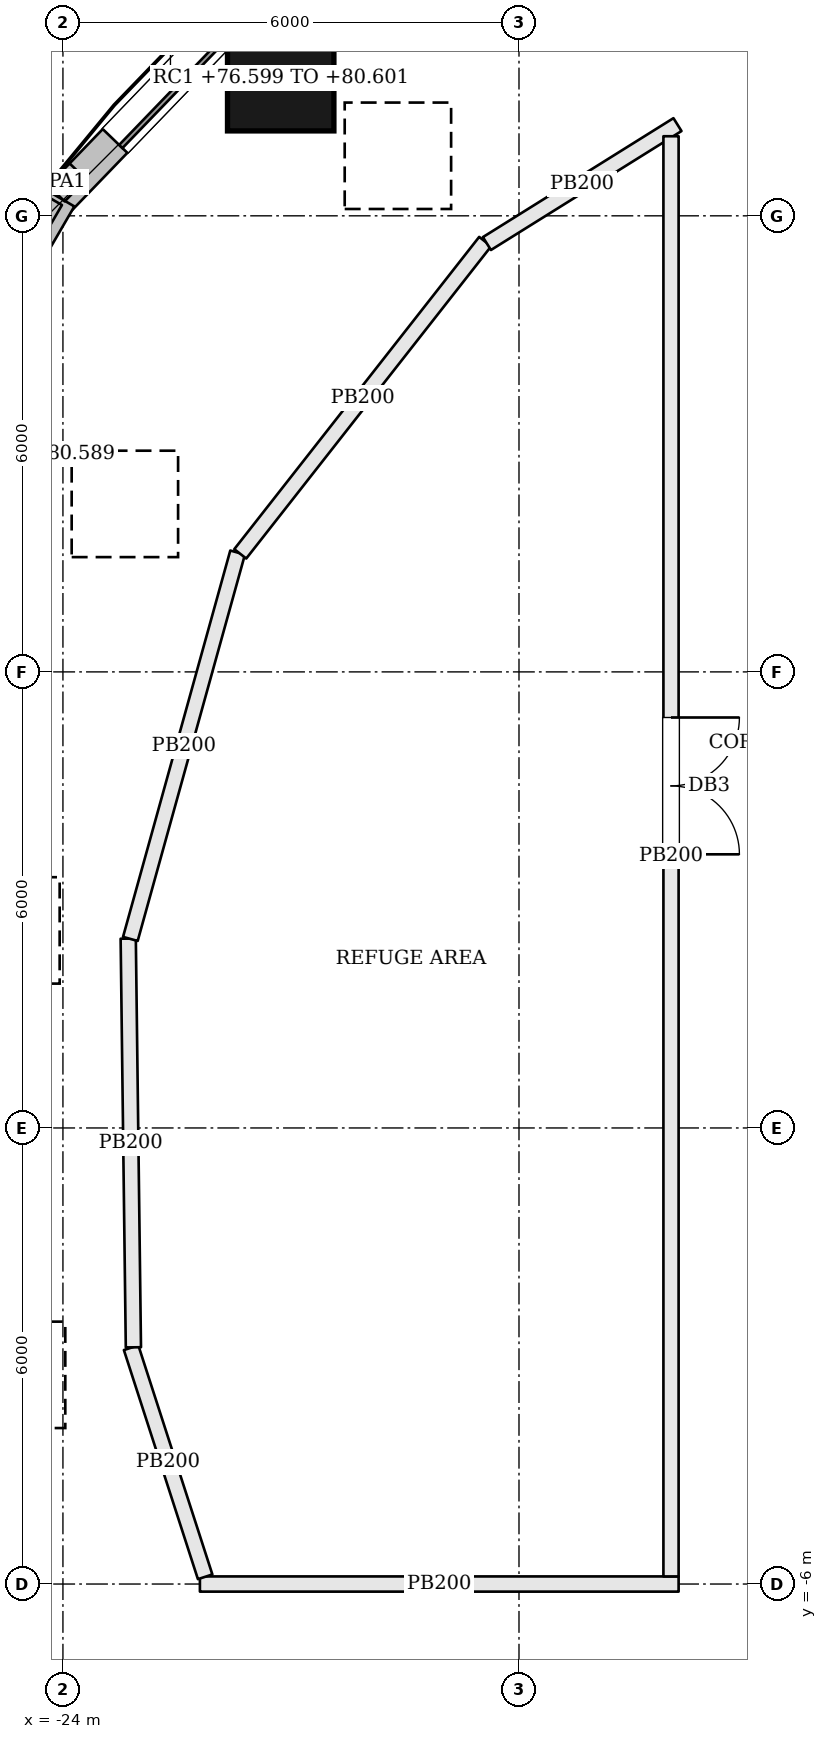
"""IFC4 building model, lengths in metres.
Left out: names, types, materials, properties, quantities, classifications, styles, units other than length and angle.
Written with IfcOpenShell. Run it as: python <this file> out.ifc"""

import sys

from ifc_helpers import new_model, si_unit, direction, frame, frame_2d, origin, origin_2d, place, context, subcontext, project, spatial, rectangle, extrude, element, fill, save


model = new_model("IFC4")
c1 = context("Model", 3, precision=1e-05, world=origin(), true_north=direction((0.0, 1.0)))
c2 = subcontext(c1, "Body", "Model", "MODEL_VIEW")
j1 = project(units=[si_unit("LENGTHUNIT", "METRE"), si_unit("PLANEANGLEUNIT", "RADIAN")], contexts=[c1])
p1 = place(None, origin())
s1 = spatial("IfcSite", under=j1, at=p1, CompositionType="ELEMENT")
p2 = place(p1, origin())
s2 = spatial("IfcBuilding", under=s1, at=p2, CompositionType="ELEMENT")
p3 = place(p2, frame((0.0, 0.0, 77.1)))
s3 = spatial("IfcBuildingStorey", under=s2, at=p3, CompositionType="ELEMENT", Elevation=77.1)
p4 = place(p3, frame((-21.135, 13.817, -0.501), z_axis=(0.349660781427, -0.232848835763, 0.907479342804), x_axis=(0.554274366932, 0.832334023191, 0.0)))
e1 = element("IfcColumn", 1, at=p4, inside=s3, PredefinedType="COLUMN", context=c2, shape_type="SweptSolid", body=[
    extrude(rectangle(XDim=1.4, YDim=1.4, at=origin_2d()), origin(), (0.0, 0.0, 1.0), 4.41),
])
p5 = place(p3, frame((-25.003, 8.866, -0.489), z_axis=(0.411038008835, -0.148329187448, 0.899469959167), x_axis=(0.339439573807, 0.940627862512, 0.0)))
e2 = element("IfcColumn", 2, at=p5, inside=s3, PredefinedType="COLUMN", context=c2, shape_type="SweptSolid", body=[
    extrude(rectangle(XDim=1.4, YDim=1.4, at=origin_2d()), origin(), (0.0, 0.0, 1.0), 4.423),
])
p6 = place(p3, frame((-26.684, 2.808, -0.486), z_axis=(0.438598518342, -0.047219259427, 0.897441742537), x_axis=(0.107040869818, 0.994254621407, 0.0)))
e3 = element("IfcColumn", 3, at=p6, inside=s3, PredefinedType="COLUMN", context=c2, shape_type="SweptSolid", body=[
    extrude(rectangle(XDim=1.4, YDim=1.4, at=origin_2d()), origin(), (0.0, 0.0, 1.0), 4.426),
])
p7 = place(p3, frame((-26.605, -3.503, -0.486), z_axis=(0.437424329961, 0.05758776803, 0.897409385137), x_axis=(-0.130525663052, 0.99144493104, 0.0)))
e4 = element("IfcColumn", 4, at=p7, inside=s3, PredefinedType="COLUMN", context=c2, shape_type="SweptSolid", body=[
    extrude(rectangle(XDim=1.4, YDim=1.4, at=origin_2d()), origin(), (0.0, 0.0, 1.0), 4.426),
])
p8 = place(p3, frame((-21.094, 15.288, 0.0), z_axis=(0.0, 0.0, 1.0), x_axis=(-0.69406513137, -0.719912212298, 0.0)))
e5 = element("IfcWall", 5, at=p8, inside=s3, PredefinedType="SOLIDWALL", context=c2, shape_type="SweptSolid", body=[
    extrude(rectangle(XDim=4.298, YDim=0.45, at=frame_2d((2.149, 0.0))), origin(), (0.0, 0.0, 1.0), 4.3),
])
p9 = place(p8, frame((1.099, 0.0, 1.2)))
e6 = element("IfcOpeningElement", 6, at=p9, cuts=e5, PredefinedType="OPENING", context=c2, shape_type="SweptSolid", body=[
    extrude(rectangle(XDim=2.1, YDim=1.8, at=frame_2d((1.05, 0.9))), frame((0.0, 0.235, 0.0), z_axis=(0.0, -1.0, 0.0), x_axis=(1.0, 0.0, 0.0)), (0.0, 0.0, 1.0), 0.47),
])
p10 = place(p3, frame((-24.044, 12.237, 0.0), z_axis=(0.0, 0.0, 1.0), x_axis=(-0.502203169453, -0.864749661227, 0.0)))
e7 = element("IfcWall", 7, at=p10, inside=s3, PredefinedType="SOLIDWALL", context=c2, shape_type="SweptSolid", body=[
    extrude(rectangle(XDim=4.353, YDim=0.45, at=frame_2d((2.176, 0.0))), origin(), (0.0, 0.0, 1.0), 4.3),
])
p11 = place(p10, frame((1.126, 0.0, 1.2)))
e8 = element("IfcOpeningElement", 8, at=p11, cuts=e7, PredefinedType="OPENING", context=c2, shape_type="SweptSolid", body=[
    extrude(rectangle(XDim=2.1, YDim=1.8, at=frame_2d((1.05, 0.9))), frame((0.0, 0.235, 0.0), z_axis=(0.0, -1.0, 0.0), x_axis=(1.0, 0.0, 0.0)), (0.0, 0.0, 1.0), 0.47),
])
p12 = place(p3, frame((-23.804, 12.585, 4.5), z_axis=(0.0, 0.0, 1.0), x_axis=(-0.694012708719, -0.719962749132, 0.0)))
e9 = element("IfcWall", 9, at=p12, inside=s3, PredefinedType="PARAPET", context=c2, shape_type="SweptSolid", body=[
    extrude(rectangle(XDim=0.405, YDim=0.3, at=frame_2d((0.202, 0.0))), origin(), (0.0, 0.0, 1.0), 1.1),
])
p13 = place(p3, frame((-24.143, 12.217, 4.5), z_axis=(0.0, 0.0, 1.0), x_axis=(-0.502258354831, -0.864717609976, 0.0)))
e10 = element("IfcWall", 10, at=p13, inside=s3, PredefinedType="PARAPET", context=c2, shape_type="SweptSolid", body=[
    extrude(rectangle(XDim=4.219, YDim=0.3, at=frame_2d((2.11, 0.0))), origin(), (0.0, 0.0, 1.0), 1.1),
])
p14 = place(p3, frame((-15.9, -6.0, 0.0), z_axis=(0.0, 0.0, 1.0), x_axis=(-1.0, 0.0, 0.0)))
e11 = element("IfcWall", 11, at=p14, inside=s3, PredefinedType="PARTITIONING", context=c2, shape_type="SweptSolid", body=[
    extrude(rectangle(XDim=6.298, YDim=0.2, at=frame_2d((3.149, 0.0))), origin(), (0.0, 0.0, 1.0), 4.3),
])
p15 = place(p3, frame((-22.129, -5.905, 0.0), z_axis=(0.0, 0.0, 1.0), x_axis=(-0.307543224341, 0.951534111402, 0.0)))
e12 = element("IfcWall", 12, at=p15, inside=s3, PredefinedType="PARTITIONING", context=c2, shape_type="SweptSolid", body=[
    extrude(rectangle(XDim=3.167, YDim=0.2, at=frame_2d((1.584, 0.0))), origin(), (0.0, 0.0, 1.0), 4.3),
])
p16 = place(p3, frame((-23.073, -2.886, 0.0), z_axis=(0.0, 0.0, 1.0), x_axis=(-0.012666982201, 0.999919770563, 0.0)))
e13 = element("IfcWall", 13, at=p16, inside=s3, PredefinedType="PARTITIONING", context=c2, shape_type="SweptSolid", body=[
    extrude(rectangle(XDim=5.377, YDim=0.2, at=frame_2d((2.689, 0.0))), origin(), (0.0, 0.0, 1.0), 4.3),
])
p17 = place(p3, frame((-23.113, 2.487, 0.0), z_axis=(0.0, 0.0, 1.0), x_axis=(0.267500643582, 0.963557681555, 0.0)))
e14 = element("IfcWall", 14, at=p17, inside=s3, PredefinedType="PARTITIONING", context=c2, shape_type="SweptSolid", body=[
    extrude(rectangle(XDim=5.275, YDim=0.2, at=frame_2d((2.638, 0.0))), origin(), (0.0, 0.0, 1.0), 4.3),
])
p18 = place(p3, frame((-21.667, 7.553, 0.0), z_axis=(0.0, 0.0, 1.0), x_axis=(0.617143909163, 0.786850300491, 0.0)))
e15 = element("IfcWall", 15, at=p18, inside=s3, PredefinedType="PARTITIONING", context=c2, shape_type="SweptSolid", body=[
    extrude(rectangle(XDim=5.221, YDim=0.2, at=frame_2d((2.61, 0.0))), origin(), (0.0, 0.0, 1.0), 4.3),
])
p19 = place(p3, frame((-18.422, 11.635, 0.0), z_axis=(0.0, 0.0, 1.0), x_axis=(0.848299824463, 0.529516201656, 0.0)))
e16 = element("IfcWall", 16, at=p19, inside=s3, PredefinedType="PARTITIONING", context=c2, shape_type="SweptSolid", body=[
    extrude(rectangle(XDim=2.955, YDim=0.2, at=frame_2d((1.478, 0.0))), origin(), (0.0, 0.0, 1.0), 4.3),
])
p20 = place(p3, frame((-16.0, 13.047, 0.0), z_axis=(0.0, 0.0, 1.0), x_axis=(0.0, -1.0, 0.0)))
e17 = element("IfcWall", 17, at=p20, inside=s3, PredefinedType="PARTITIONING", context=c2, shape_type="SweptSolid", body=[
    extrude(rectangle(XDim=18.947, YDim=0.2, at=frame_2d((9.474, 0.0))), origin(), (0.0, 0.0, 1.0), 4.3),
])
p21 = place(p20, frame((7.647, 0.0, 0.0)))
e18 = element("IfcOpeningElement", 18, at=p21, cuts=e17, PredefinedType="OPENING", context=c2, shape_type="SweptSolid", body=[
    extrude(rectangle(XDim=1.8, YDim=2.1, at=frame_2d((0.9, 1.05))), frame((0.0, 0.11, 0.0), z_axis=(0.0, -1.0, 0.0), x_axis=(1.0, 0.0, 0.0)), (0.0, 0.0, 1.0), 0.22),
])
p22 = place(p9, origin())
e19 = element("IfcWindow", 19, at=p22, inside=s3, PartitioningType="SINGLE_PANEL", PredefinedType="WINDOW", context=c2, shape_type="SweptSolid", body=[
    extrude(rectangle(XDim=2.1, YDim=1.8, at=frame_2d((1.05, 0.9))), frame((0.0, 0.135, 0.0), z_axis=(0.0, -1.0, 0.0), x_axis=(1.0, 0.0, 0.0)), (0.0, 0.0, 1.0), 0.06),
])
fill(e6, e19)
p23 = place(p21, origin())
e20 = element("IfcDoor", 20, at=p23, inside=s3, OperationType="DOUBLE_DOOR_SINGLE_SWING", PredefinedType="DOOR", context=c2, shape_type="SweptSolid", body=[
    extrude(rectangle(XDim=1.8, YDim=2.1, at=frame_2d((0.9, 1.05))), frame((0.0, 0.025, 0.0), z_axis=(0.0, -1.0, 0.0), x_axis=(1.0, 0.0, 0.0)), (0.0, 0.0, 1.0), 0.05),
])
fill(e18, e20)
save(model, sys.argv[1])
